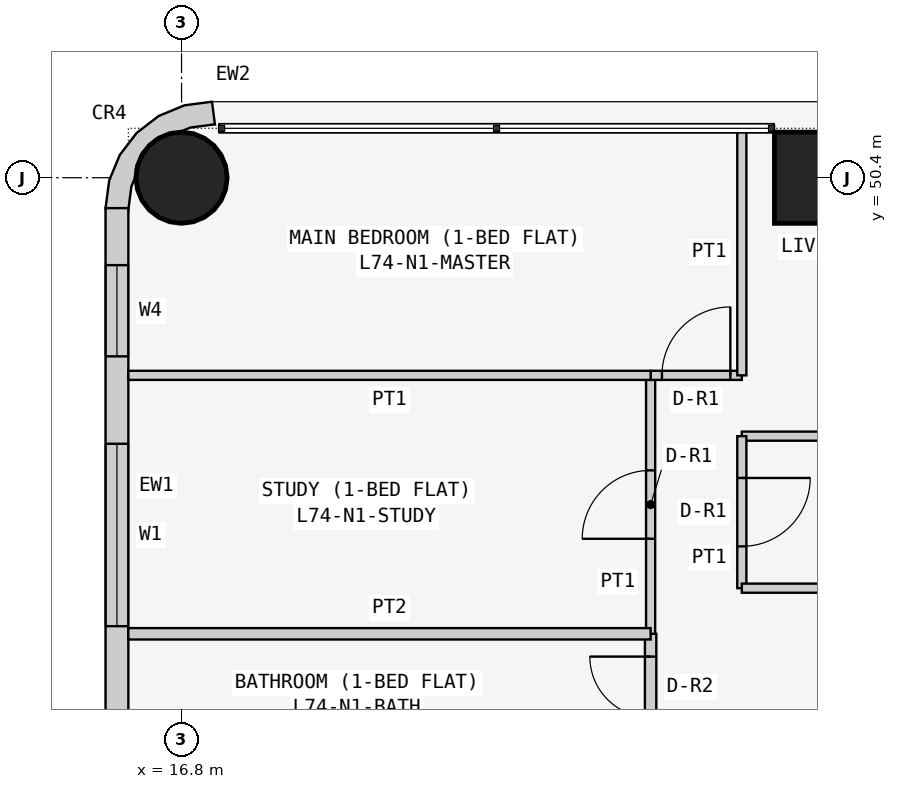
"""IFC4 building model, lengths in metres.
Left out: names, types, materials, properties, quantities, classifications, styles, units other than length and angle.
Written with IfcOpenShell. Run it as: python <this file> out.ifc"""

import sys

from ifc_helpers import new_model, si_unit, direction, frame, frame_2d, origin, origin_2d, place, context, subcontext, project, spatial, polyline, rectangle, circle, outline, extrude, element, fill, save


model = new_model("IFC4")
c1 = context("Model", 3, precision=1e-05, world=origin(), true_north=direction((0.0, 1.0)))
c2 = subcontext(c1, "Body", "Model", "MODEL_VIEW")
j1 = project(units=[si_unit("LENGTHUNIT", "METRE"), si_unit("PLANEANGLEUNIT", "RADIAN")], contexts=[c1])
p1 = place(None, origin())
s1 = spatial("IfcSite", under=j1, at=p1, CompositionType="ELEMENT")
p2 = place(p1, origin())
s2 = spatial("IfcBuilding", under=s1, at=p2, CompositionType="ELEMENT")
p3 = place(p2, frame((0.0, 0.0, 282.9)))
s3 = spatial("IfcBuildingStorey", under=s2, at=p3, CompositionType="ELEMENT", Elevation=282.9)
p4 = place(p3, frame((16.8, 50.4, 0.0), z_axis=(0.0, 0.0, 1.0), x_axis=(1.0, 0.0, 0.0)))
e1 = element("IfcColumn", 1, at=p4, inside=s3, PredefinedType="COLUMN", context=c2, shape_type="SweptSolid", body=[
    extrude(circle(Radius=0.6, at=origin_2d()), origin(), (0.0, 0.0, 1.0), 3.6),
])
p5 = place(p3, frame((25.2, 50.4, 0.0), z_axis=(0.0, 0.0, 1.0), x_axis=(1.0, 0.0, 0.0)))
e2 = element("IfcColumn", 2, at=p5, inside=s3, PredefinedType="COLUMN", context=c2, shape_type="SweptSolid", body=[
    extrude(rectangle(XDim=1.2, YDim=1.2, at=origin_2d()), origin(), (0.0, 0.0, 1.0), 3.6),
])
p6 = place(p3, frame((15.95, 50.0, 0.0), z_axis=(0.0, 0.0, 1.0), x_axis=(0.0, -1.0, 0.0)))
e3 = element("IfcWall", 3, at=p6, inside=s3, PredefinedType="SOLIDWALL", context=c2, shape_type="SweptSolid", body=[
    extrude(rectangle(XDim=7.3, YDim=0.3, at=frame_2d((3.65, 0.0))), origin(), (0.0, 0.0, 1.0), 3.45),
])
p7 = place(p6, frame((3.1, 0.0, 0.9)))
e4 = element("IfcOpeningElement", 4, at=p7, cuts=e3, PredefinedType="OPENING", context=c2, shape_type="SweptSolid", body=[
    extrude(rectangle(XDim=2.4, YDim=1.5, at=frame_2d((1.2, 0.75))), frame((0.0, 0.16, 0.0), z_axis=(0.0, -1.0, 0.0), x_axis=(1.0, 0.0, 0.0)), (0.0, 0.0, 1.0), 0.32),
])
p8 = place(p6, frame((0.75, 0.0, 0.9)))
e5 = element("IfcOpeningElement", 5, at=p8, cuts=e3, PredefinedType="OPENING", context=c2, shape_type="SweptSolid", body=[
    extrude(rectangle(XDim=1.2, YDim=1.5, at=frame_2d((0.6, 0.75))), frame((0.0, 0.16, 0.0), z_axis=(0.0, -1.0, 0.0), x_axis=(1.0, 0.0, 0.0)), (0.0, 0.0, 1.0), 0.32),
])
p9 = place(p3, frame((17.162, 50.976, 0.0), z_axis=(0.0, 0.0, 1.0), x_axis=(-0.707106781187, 0.707106781187, 0.0)))
e6 = element("IfcWall", 6, at=p9, inside=s3, PredefinedType="SOLIDWALL", context=c2, shape_type="SweptSolid", body=[
    extrude(outline(polyline([(0.047, -0.129), (0.033, -0.143), (0.273, -0.327), (0.495, -0.037), (0.635, 0.301), (0.683, 0.663), (0.635, 1.025), (0.495, 1.363), (0.273, 1.653), (0.033, 1.469), (0.047, 1.455), (0.233, 1.212), (0.292, 1.069), (0.358, 1.003), (0.449, 0.782), (0.449, 0.543), (0.358, 0.322), (0.292, 0.257), (0.233, 0.114), (0.047, -0.129)])), origin(), (0.0, 0.0, 1.0), 3.45),
])
p10 = place(p3, frame((29.4, 47.0, 0.0), z_axis=(0.0, 0.0, 1.0), x_axis=(-1.0, 0.0, 0.0)))
e7 = element("IfcWall", 7, at=p10, inside=s3, PredefinedType="PARTITIONING", context=c2, shape_type="SweptSolid", body=[
    extrude(rectangle(XDim=5.229, YDim=0.12, at=frame_2d((2.615, 0.0))), origin(), (0.0, 0.0, 1.0), 3.45),
])
p11 = place(p3, frame((24.171, 47.0, 0.0), z_axis=(0.0, 0.0, 1.0), x_axis=(0.0, -1.0, 0.0)))
e8 = element("IfcWall", 8, at=p11, inside=s3, PredefinedType="PARTITIONING", context=c2, shape_type="SweptSolid", body=[
    extrude(rectangle(XDim=2.0, YDim=0.12, at=frame_2d((1.0, 0.0))), origin(), (0.0, 0.0, 1.0), 3.45),
])
p12 = place(p11, frame((0.55, 0.0, 0.0)))
e9 = element("IfcOpeningElement", 9, at=p12, cuts=e8, PredefinedType="OPENING", context=c2, shape_type="SweptSolid", body=[
    extrude(rectangle(XDim=0.9, YDim=2.1, at=frame_2d((0.45, 1.05))), frame((0.0, 0.07, 0.0), z_axis=(0.0, -1.0, 0.0), x_axis=(1.0, 0.0, 0.0)), (0.0, 0.0, 1.0), 0.14),
])
p13 = place(p3, frame((24.171, 45.0, 0.0), z_axis=(0.0, 0.0, 1.0), x_axis=(1.0, 0.0, 0.0)))
e10 = element("IfcWall", 10, at=p13, inside=s3, PredefinedType="PARTITIONING", context=c2, shape_type="SweptSolid", body=[
    extrude(rectangle(XDim=5.229, YDim=0.12, at=frame_2d((2.615, 0.0))), origin(), (0.0, 0.0, 1.0), 3.45),
])
p14 = place(p3, frame((22.971, 42.725, 0.0), z_axis=(0.0, 0.0, 1.0), x_axis=(0.0, 1.0, 0.0)))
e11 = element("IfcWall", 11, at=p14, inside=s3, PredefinedType="PARTITIONING", context=c2, shape_type="SweptSolid", body=[
    extrude(rectangle(XDim=1.675, YDim=0.15, at=frame_2d((0.837, 0.0))), origin(), (0.0, 0.0, 1.0), 3.45),
])
p15 = place(p14, frame((0.575, 0.0, 0.0)))
e12 = element("IfcOpeningElement", 12, at=p15, cuts=e11, PredefinedType="OPENING", context=c2, shape_type="SweptSolid", body=[
    extrude(rectangle(XDim=0.8, YDim=2.1, at=frame_2d((0.4, 1.05))), frame((0.0, 0.085, 0.0), z_axis=(0.0, -1.0, 0.0), x_axis=(1.0, 0.0, 0.0)), (0.0, 0.0, 1.0), 0.17),
])
p16 = place(p3, frame((22.971, 44.4, 0.0), z_axis=(0.0, 0.0, 1.0), x_axis=(0.0, 1.0, 0.0)))
e13 = element("IfcWall", 13, at=p16, inside=s3, PredefinedType="PARTITIONING", context=c2, shape_type="SweptSolid", body=[
    extrude(rectangle(XDim=3.4, YDim=0.12, at=frame_2d((1.7, 0.0))), origin(), (0.0, 0.0, 1.0), 3.45),
])
p17 = place(p16, frame((1.25, 0.0, 0.0)))
e14 = element("IfcOpeningElement", 14, at=p17, cuts=e13, PredefinedType="OPENING", context=c2, shape_type="SweptSolid", body=[
    extrude(rectangle(XDim=0.9, YDim=2.1, at=frame_2d((0.45, 1.05))), frame((0.0, 0.07, 0.0), z_axis=(0.0, -1.0, 0.0), x_axis=(1.0, 0.0, 0.0)), (0.0, 0.0, 1.0), 0.14),
])
p18 = place(p3, frame((22.971, 47.8, 0.0), z_axis=(0.0, 0.0, 1.0), x_axis=(1.0, 0.0, 0.0)))
e15 = element("IfcWall", 15, at=p18, inside=s3, PredefinedType="PARTITIONING", context=c2, shape_type="SweptSolid", body=[
    extrude(rectangle(XDim=1.2, YDim=0.12, at=frame_2d((0.6, 0.0))), origin(), (0.0, 0.0, 1.0), 3.45),
])
p19 = place(p18, frame((0.149, 0.0, 0.0)))
e16 = element("IfcOpeningElement", 16, at=p19, cuts=e15, PredefinedType="OPENING", context=c2, shape_type="SweptSolid", body=[
    extrude(rectangle(XDim=0.9, YDim=2.1, at=frame_2d((0.45, 1.05))), frame((0.0, 0.07, 0.0), z_axis=(0.0, -1.0, 0.0), x_axis=(1.0, 0.0, 0.0)), (0.0, 0.0, 1.0), 0.14),
])
p20 = place(p3, frame((24.171, 47.8, 0.0), z_axis=(0.0, 0.0, 1.0), x_axis=(0.0, 1.0, 0.0)))
e17 = element("IfcWall", 17, at=p20, inside=s3, PredefinedType="PARTITIONING", context=c2, shape_type="SweptSolid", body=[
    extrude(rectangle(XDim=3.25, YDim=0.12, at=frame_2d((1.625, 0.0))), origin(), (0.0, 0.0, 1.0), 3.45),
])
p21 = place(p3, frame((22.971, 44.4, 0.0), z_axis=(0.0, 0.0, 1.0), x_axis=(-1.0, 0.0, 0.0)))
e18 = element("IfcWall", 18, at=p21, inside=s3, PredefinedType="PARTITIONING", context=c2, shape_type="SweptSolid", body=[
    extrude(rectangle(XDim=6.871, YDim=0.15, at=frame_2d((3.436, 0.0))), origin(), (0.0, 0.0, 1.0), 3.45),
])
p22 = place(p3, frame((22.971, 47.8, 0.0), z_axis=(0.0, 0.0, 1.0), x_axis=(-1.0, 0.0, 0.0)))
e19 = element("IfcWall", 19, at=p22, inside=s3, PredefinedType="PARTITIONING", context=c2, shape_type="SweptSolid", body=[
    extrude(rectangle(XDim=6.871, YDim=0.12, at=frame_2d((3.436, 0.0))), origin(), (0.0, 0.0, 1.0), 3.45),
])
p23 = place(p7, origin())
e20 = element("IfcWindow", 20, at=p23, inside=s3, PartitioningType="SINGLE_PANEL", PredefinedType="WINDOW", context=c2, shape_type="SweptSolid", body=[
    extrude(rectangle(XDim=2.4, YDim=1.5, at=frame_2d((1.2, 0.75))), frame((0.0, 0.03, 0.0), z_axis=(0.0, -1.0, 0.0), x_axis=(1.0, 0.0, 0.0)), (0.0, 0.0, 1.0), 0.06),
])
fill(e4, e20)
p24 = place(p8, origin())
e21 = element("IfcWindow", 21, at=p24, inside=s3, PartitioningType="SINGLE_PANEL", PredefinedType="WINDOW", context=c2, shape_type="SweptSolid", body=[
    extrude(rectangle(XDim=1.2, YDim=1.5, at=frame_2d((0.6, 0.75))), frame((0.0, 0.03, 0.0), z_axis=(0.0, -1.0, 0.0), x_axis=(1.0, 0.0, 0.0)), (0.0, 0.0, 1.0), 0.06),
])
fill(e5, e21)
p25 = place(p12, origin())
e22 = element("IfcDoor", 22, at=p25, inside=s3, OperationType="SINGLE_SWING_LEFT", PredefinedType="DOOR", context=c2, shape_type="SweptSolid", body=[
    extrude(rectangle(XDim=0.9, YDim=2.1, at=frame_2d((0.45, 1.05))), frame((0.0, 0.025, 0.0), z_axis=(0.0, -1.0, 0.0), x_axis=(1.0, 0.0, 0.0)), (0.0, 0.0, 1.0), 0.05),
])
fill(e9, e22)
p26 = place(p15, origin())
e23 = element("IfcDoor", 23, at=p26, inside=s3, OperationType="SINGLE_SWING_RIGHT", PredefinedType="DOOR", context=c2, shape_type="SweptSolid", body=[
    extrude(rectangle(XDim=0.8, YDim=2.1, at=frame_2d((0.4, 1.05))), frame((0.0, 0.025, 0.0), z_axis=(0.0, -1.0, 0.0), x_axis=(1.0, 0.0, 0.0)), (0.0, 0.0, 1.0), 0.05),
])
fill(e12, e23)
p27 = place(p17, origin())
e24 = element("IfcDoor", 24, at=p27, inside=s3, OperationType="SINGLE_SWING_LEFT", PredefinedType="DOOR", context=c2, shape_type="SweptSolid", body=[
    extrude(rectangle(XDim=0.9, YDim=2.1, at=frame_2d((0.45, 1.05))), frame((0.0, 0.025, 0.0), z_axis=(0.0, -1.0, 0.0), x_axis=(1.0, 0.0, 0.0)), (0.0, 0.0, 1.0), 0.05),
])
fill(e14, e24)
p28 = place(p19, origin())
e25 = element("IfcDoor", 25, at=p28, inside=s3, OperationType="SINGLE_SWING_RIGHT", PredefinedType="DOOR", context=c2, shape_type="SweptSolid", body=[
    extrude(rectangle(XDim=0.9, YDim=2.1, at=frame_2d((0.45, 1.05))), frame((0.0, 0.025, 0.0), z_axis=(0.0, -1.0, 0.0), x_axis=(1.0, 0.0, 0.0)), (0.0, 0.0, 1.0), 0.05),
])
fill(e16, e25)
save(model, sys.argv[1])
